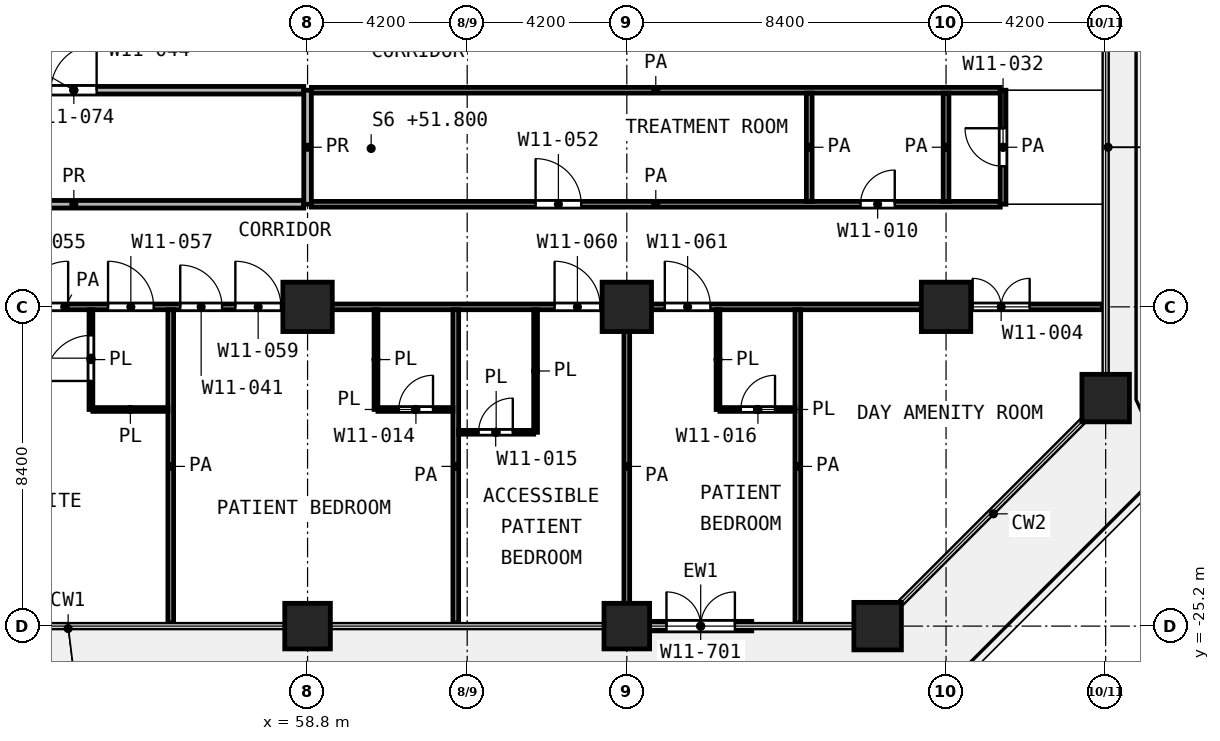
"""IFC4 building model, lengths in metres.
Left out: names, types, materials, properties, quantities, classifications, styles, units other than length and angle.
Written with IfcOpenShell. Run it as: python <this file> out.ifc"""

import sys

from ifc_helpers import new_model, si_unit, direction, frame, frame_2d, origin, origin_2d, place, context, subcontext, project, spatial, rectangle, extrude, element, fill, save


model = new_model("IFC4")
c1 = context("Model", 3, precision=1e-05, world=origin(), true_north=direction((0.0, 1.0)))
c2 = subcontext(c1, "Body", "Model", "MODEL_VIEW")
j1 = project(units=[si_unit("LENGTHUNIT", "METRE"), si_unit("PLANEANGLEUNIT", "RADIAN")], contexts=[c1])
p1 = place(None, origin())
s1 = spatial("IfcSite", under=j1, at=p1, CompositionType="ELEMENT")
p2 = place(p1, origin())
s2 = spatial("IfcBuilding", under=s1, at=p2, CompositionType="ELEMENT")
p3 = place(p2, frame((0.0, 0.0, 51.8)))
s3 = spatial("IfcBuildingStorey", under=s2, at=p3, CompositionType="ELEMENT", Elevation=51.8)
for number, where, z_axis, x_axis in (
    (1, (58.8, -16.8, 0.0), (0.0, 0.0, 1.0), (1.0, 0.0, 0.0)),
    (2, (67.2, -16.8, 0.0), (0.0, 0.0, 1.0), (1.0, 0.0, 0.0)),
    (3, (75.6, -16.8, 0.0), (0.0, 0.0, 1.0), (1.0, 0.0, 0.0)),
):
    element("IfcColumn", number, at=place(p3, frame(where, z_axis=z_axis, x_axis=x_axis)), inside=s3, PredefinedType="COLUMN", context=c2, shape_type="SweptSolid", body=[
        extrude(rectangle(XDim=1.3, YDim=1.3, at=origin_2d()), origin(), (0.0, 0.0, 1.0), 4.2),
    ])
p4 = place(p3, frame((79.8, -19.2, 0.0), z_axis=(0.0, 0.0, 1.0), x_axis=(1.0, 0.0, 0.0)))
e4 = element("IfcColumn", 4, at=p4, inside=s3, PredefinedType="COLUMN", context=c2, shape_type="SweptSolid", body=[
    extrude(rectangle(XDim=1.25, YDim=1.25, at=origin_2d()), origin(), (0.0, 0.0, 1.0), 4.2),
])
for number, where, z_axis, x_axis in (
    (5, (58.8, -25.2, 0.0), (0.0, 0.0, 1.0), (1.0, 0.0, 0.0)),
    (6, (67.2, -25.2, 0.0), (0.0, 0.0, 1.0), (1.0, 0.0, 0.0)),
):
    element("IfcColumn", number, at=place(p3, frame(where, z_axis=z_axis, x_axis=x_axis)), inside=s3, PredefinedType="COLUMN", context=c2, shape_type="SweptSolid", body=[
        extrude(rectangle(XDim=1.2, YDim=1.2, at=origin_2d()), origin(), (0.0, 0.0, 1.0), 4.2),
    ])
p5 = place(p3, frame((73.8, -25.2, 0.0), z_axis=(0.0, 0.0, 1.0), x_axis=(1.0, 0.0, 0.0)))
e7 = element("IfcColumn", 7, at=p5, inside=s3, PredefinedType="COLUMN", context=c2, shape_type="SweptSolid", body=[
    extrude(rectangle(XDim=1.25, YDim=1.25, at=origin_2d()), origin(), (0.0, 0.0, 1.0), 4.2),
])
p6 = place(p3, frame((67.8, -25.2, 0.0), z_axis=(0.0, 0.0, 1.0), x_axis=(1.0, 0.0, 0.0)))
e8 = element("IfcWall", 8, at=p6, inside=s3, PredefinedType="SOLIDWALL", context=c2, shape_type="SweptSolid", body=[
    extrude(rectangle(XDim=2.688, YDim=0.25, at=frame_2d((1.344, 0.0))), origin(), (0.0, 0.0, 1.0), 3.78),
])
p7 = place(p6, frame((0.444, 0.0, 0.0)))
e9 = element("IfcOpeningElement", 9, at=p7, cuts=e8, PredefinedType="OPENING", context=c2, shape_type="SweptSolid", body=[
    extrude(rectangle(XDim=1.8, YDim=2.1, at=frame_2d((0.9, 1.05))), frame((0.0, 0.135, 0.0), z_axis=(0.0, -1.0, 0.0), x_axis=(1.0, 0.0, 0.0)), (0.0, 0.0, 1.0), 0.27),
])
p8 = place(p3, frame((62.775, -20.1, 0.0), z_axis=(0.0, 0.0, 1.0), x_axis=(1.0, 0.0, 0.0)))
e10 = element("IfcWall", 10, at=p8, inside=s3, PredefinedType="PARTITIONING", context=c2, shape_type="SweptSolid", body=[
    extrude(rectangle(XDim=1.975, YDim=0.1, at=frame_2d((0.988, 0.0))), origin(), (0.0, 0.0, 1.0), 3.9),
])
p9 = place(p8, frame((0.525, 0.0, 0.0)))
e11 = element("IfcOpeningElement", 11, at=p9, cuts=e10, PredefinedType="OPENING", context=c2, shape_type="SweptSolid", body=[
    extrude(rectangle(XDim=0.9, YDim=2.1, at=frame_2d((0.45, 1.05))), frame((0.0, 0.06, 0.0), z_axis=(0.0, -1.0, 0.0), x_axis=(1.0, 0.0, 0.0)), (0.0, 0.0, 1.0), 0.12),
])
p10 = place(p3, frame((53.15, -19.5, 0.0), z_axis=(0.0, 0.0, 1.0), x_axis=(1.0, 0.0, 0.0)))
e12 = element("IfcWall", 12, at=p10, inside=s3, PredefinedType="PARTITIONING", context=c2, shape_type="SweptSolid", body=[
    extrude(rectangle(XDim=1.975, YDim=0.1, at=frame_2d((0.988, 0.0))), origin(), (0.0, 0.0, 1.0), 3.9),
])
p11 = place(p3, frame((60.652, -19.5, 0.0), z_axis=(0.0, 0.0, 1.0), x_axis=(1.0, 0.0, 0.0)))
e13 = element("IfcWall", 13, at=p11, inside=s3, PredefinedType="PARTITIONING", context=c2, shape_type="SweptSolid", body=[
    extrude(rectangle(XDim=1.973, YDim=0.1, at=frame_2d((0.986, 0.0))), origin(), (0.0, 0.0, 1.0), 3.9),
])
p12 = place(p11, frame((0.549, 0.0, 0.0)))
e14 = element("IfcOpeningElement", 14, at=p12, cuts=e13, PredefinedType="OPENING", context=c2, shape_type="SweptSolid", body=[
    extrude(rectangle(XDim=0.9, YDim=2.1, at=frame_2d((0.45, 1.05))), frame((0.0, 0.06, 0.0), z_axis=(0.0, -1.0, 0.0), x_axis=(1.0, 0.0, 0.0)), (0.0, 0.0, 1.0), 0.12),
])
p13 = place(p3, frame((69.65, -19.5, 0.0), z_axis=(0.0, 0.0, 1.0), x_axis=(1.0, 0.0, 0.0)))
e15 = element("IfcWall", 15, at=p13, inside=s3, PredefinedType="PARTITIONING", context=c2, shape_type="SweptSolid", body=[
    extrude(rectangle(XDim=1.975, YDim=0.1, at=frame_2d((0.988, 0.0))), origin(), (0.0, 0.0, 1.0), 3.9),
])
p14 = place(p13, frame((0.55, 0.0, 0.0)))
e16 = element("IfcOpeningElement", 16, at=p14, cuts=e15, PredefinedType="OPENING", context=c2, shape_type="SweptSolid", body=[
    extrude(rectangle(XDim=0.9, YDim=2.1, at=frame_2d((0.45, 1.05))), frame((0.0, 0.06, 0.0), z_axis=(0.0, -1.0, 0.0), x_axis=(1.0, 0.0, 0.0)), (0.0, 0.0, 1.0), 0.12),
])
p15 = place(p3, frame((53.1, -19.5, 0.0), z_axis=(0.0, 0.0, 1.0), x_axis=(0.0, 1.0, 0.0)))
e17 = element("IfcWall", 17, at=p15, inside=s3, PredefinedType="PARTITIONING", context=c2, shape_type="SweptSolid", body=[
    extrude(rectangle(XDim=2.625, YDim=0.1, at=frame_2d((1.312, 0.0))), origin(), (0.0, 0.0, 1.0), 3.9),
])
p16 = place(p15, frame((0.75, 0.0, 0.0)))
e18 = element("IfcOpeningElement", 18, at=p16, cuts=e17, PredefinedType="OPENING", context=c2, shape_type="SweptSolid", body=[
    extrude(rectangle(XDim=1.2, YDim=2.1, at=frame_2d((0.6, 1.05))), frame((0.0, 0.06, 0.0), z_axis=(0.0, -1.0, 0.0), x_axis=(1.0, 0.0, 0.0)), (0.0, 0.0, 1.0), 0.12),
])
p17 = place(p3, frame((60.6, -19.499, 0.0), z_axis=(0.0, 0.0, 1.0), x_axis=(0.0, 1.0, 0.0)))
e19 = element("IfcWall", 19, at=p17, inside=s3, PredefinedType="PARTITIONING", context=c2, shape_type="SweptSolid", body=[
    extrude(rectangle(XDim=2.624, YDim=0.1, at=frame_2d((1.312, 0.0))), origin(), (0.0, 0.0, 1.0), 3.9),
])
p18 = place(p3, frame((64.8, -20.1, 0.0), z_axis=(0.0, 0.0, 1.0), x_axis=(0.0, 1.0, 0.0)))
e20 = element("IfcWall", 20, at=p18, inside=s3, PredefinedType="PARTITIONING", context=c2, shape_type="SweptSolid", body=[
    extrude(rectangle(XDim=3.225, YDim=0.1, at=frame_2d((1.613, 0.0))), origin(), (0.0, 0.0, 1.0), 3.9),
])
p19 = place(p3, frame((69.6, -19.5, 0.0), z_axis=(0.0, 0.0, 1.0), x_axis=(0.0, 1.0, 0.0)))
e21 = element("IfcWall", 21, at=p19, inside=s3, PredefinedType="PARTITIONING", context=c2, shape_type="SweptSolid", body=[
    extrude(rectangle(XDim=2.625, YDim=0.1, at=frame_2d((1.312, 0.0))), origin(), (0.0, 0.0, 1.0), 3.9),
])
p20 = place(p3, frame((25.1, -16.8, 0.0), z_axis=(0.0, 0.0, 1.0), x_axis=(1.0, 0.0, 0.0)))
e22 = element("IfcWall", 22, at=p20, inside=s3, PredefinedType="PARTITIONING", context=c2, shape_type="SweptSolid", body=[
    extrude(rectangle(XDim=54.62, YDim=0.15, at=frame_2d((27.31, 0.0))), origin(), (0.0, 0.0, 1.0), 3.9),
])
p21 = place(p20, frame((1.45, 0.0, 0.0)))
e23 = element("IfcOpeningElement", 23, at=p21, cuts=e22, PredefinedType="OPENING", context=c2, shape_type="SweptSolid", body=[
    extrude(rectangle(XDim=1.5, YDim=2.1, at=frame_2d((0.75, 1.05))), frame((0.0, 0.085, 0.0), z_axis=(0.0, -1.0, 0.0), x_axis=(1.0, 0.0, 0.0)), (0.0, 0.0, 1.0), 0.17),
])
p22 = place(p20, frame((9.25, 0.0, 0.0)))
e24 = element("IfcOpeningElement", 24, at=p22, cuts=e22, PredefinedType="OPENING", context=c2, shape_type="SweptSolid", body=[
    extrude(rectangle(XDim=1.5, YDim=2.1, at=frame_2d((0.75, 1.05))), frame((0.0, 0.085, 0.0), z_axis=(0.0, -1.0, 0.0), x_axis=(1.0, 0.0, 0.0)), (0.0, 0.0, 1.0), 0.17),
])
p23 = place(p20, frame((15.0, 0.0, 0.0)))
e25 = element("IfcOpeningElement", 25, at=p23, cuts=e22, PredefinedType="OPENING", context=c2, shape_type="SweptSolid", body=[
    extrude(rectangle(XDim=1.2, YDim=2.1, at=frame_2d((0.6, 1.05))), frame((0.0, 0.085, 0.0), z_axis=(0.0, -1.0, 0.0), x_axis=(1.0, 0.0, 0.0)), (0.0, 0.0, 1.0), 0.17),
])
p24 = place(p20, frame((17.6, 0.0, 0.0)))
e26 = element("IfcOpeningElement", 26, at=p24, cuts=e22, PredefinedType="OPENING", context=c2, shape_type="SweptSolid", body=[
    extrude(rectangle(XDim=1.2, YDim=2.1, at=frame_2d((0.6, 1.05))), frame((0.0, 0.085, 0.0), z_axis=(0.0, -1.0, 0.0), x_axis=(1.0, 0.0, 0.0)), (0.0, 0.0, 1.0), 0.17),
])
p25 = place(p20, frame((26.2, 0.0, 0.0)))
e27 = element("IfcOpeningElement", 27, at=p25, cuts=e22, PredefinedType="OPENING", context=c2, shape_type="SweptSolid", body=[
    extrude(rectangle(XDim=1.2, YDim=2.1, at=frame_2d((0.6, 1.05))), frame((0.0, 0.085, 0.0), z_axis=(0.0, -1.0, 0.0), x_axis=(1.0, 0.0, 0.0)), (0.0, 0.0, 1.0), 0.17),
])
p26 = place(p20, frame((23.4, 0.0, 0.0)))
e28 = element("IfcOpeningElement", 28, at=p26, cuts=e22, PredefinedType="OPENING", context=c2, shape_type="SweptSolid", body=[
    extrude(rectangle(XDim=1.2, YDim=2.1, at=frame_2d((0.6, 1.05))), frame((0.0, 0.085, 0.0), z_axis=(0.0, -1.0, 0.0), x_axis=(1.0, 0.0, 0.0)), (0.0, 0.0, 1.0), 0.17),
])
p27 = place(p20, frame((28.45, 0.0, 0.0)))
e29 = element("IfcOpeningElement", 29, at=p27, cuts=e22, PredefinedType="OPENING", context=c2, shape_type="SweptSolid", body=[
    extrude(rectangle(XDim=1.2, YDim=2.1, at=frame_2d((0.6, 1.05))), frame((0.0, 0.085, 0.0), z_axis=(0.0, -1.0, 0.0), x_axis=(1.0, 0.0, 0.0)), (0.0, 0.0, 1.0), 0.17),
])
p28 = place(p20, frame((31.8, 0.0, 0.0)))
e30 = element("IfcOpeningElement", 30, at=p28, cuts=e22, PredefinedType="OPENING", context=c2, shape_type="SweptSolid", body=[
    extrude(rectangle(XDim=1.2, YDim=2.1, at=frame_2d((0.6, 1.05))), frame((0.0, 0.085, 0.0), z_axis=(0.0, -1.0, 0.0), x_axis=(1.0, 0.0, 0.0)), (0.0, 0.0, 1.0), 0.17),
])
p29 = place(p20, frame((30.35, 0.0, 0.0)))
e31 = element("IfcOpeningElement", 31, at=p29, cuts=e22, PredefinedType="OPENING", context=c2, shape_type="SweptSolid", body=[
    extrude(rectangle(XDim=1.1, YDim=2.1, at=frame_2d((0.55, 1.05))), frame((0.0, 0.085, 0.0), z_axis=(0.0, -1.0, 0.0), x_axis=(1.0, 0.0, 0.0)), (0.0, 0.0, 1.0), 0.17),
])
p30 = place(p20, frame((40.2, 0.0, 0.0)))
e32 = element("IfcOpeningElement", 32, at=p30, cuts=e22, PredefinedType="OPENING", context=c2, shape_type="SweptSolid", body=[
    extrude(rectangle(XDim=1.2, YDim=2.1, at=frame_2d((0.6, 1.05))), frame((0.0, 0.085, 0.0), z_axis=(0.0, -1.0, 0.0), x_axis=(1.0, 0.0, 0.0)), (0.0, 0.0, 1.0), 0.17),
])
p31 = place(p20, frame((43.1, 0.0, 0.0)))
e33 = element("IfcOpeningElement", 33, at=p31, cuts=e22, PredefinedType="OPENING", context=c2, shape_type="SweptSolid", body=[
    extrude(rectangle(XDim=1.2, YDim=2.1, at=frame_2d((0.6, 1.05))), frame((0.0, 0.085, 0.0), z_axis=(0.0, -1.0, 0.0), x_axis=(1.0, 0.0, 0.0)), (0.0, 0.0, 1.0), 0.17),
])
p32 = place(p20, frame((51.2, 0.0, 0.0)))
e34 = element("IfcOpeningElement", 34, at=p32, cuts=e22, PredefinedType="OPENING", context=c2, shape_type="SweptSolid", body=[
    extrude(rectangle(XDim=1.5, YDim=2.1, at=frame_2d((0.75, 1.05))), frame((0.0, 0.085, 0.0), z_axis=(0.0, -1.0, 0.0), x_axis=(1.0, 0.0, 0.0)), (0.0, 0.0, 1.0), 0.17),
])
p33 = place(p3, frame((58.9, -14.1, 0.0), z_axis=(0.0, 0.0, 1.0), x_axis=(1.0, 0.0, 0.0)))
e35 = element("IfcWall", 35, at=p33, inside=s3, PredefinedType="PARTITIONING", context=c2, shape_type="SweptSolid", body=[
    extrude(rectangle(XDim=18.125, YDim=0.15, at=frame_2d((9.062, 0.0))), origin(), (0.0, 0.0, 1.0), 3.9),
])
p34 = place(p33, frame((5.9, 0.0, 0.0)))
e36 = element("IfcOpeningElement", 36, at=p34, cuts=e35, PredefinedType="OPENING", context=c2, shape_type="SweptSolid", body=[
    extrude(rectangle(XDim=1.2, YDim=2.1, at=frame_2d((0.6, 1.05))), frame((0.0, 0.085, 0.0), z_axis=(0.0, -1.0, 0.0), x_axis=(1.0, 0.0, 0.0)), (0.0, 0.0, 1.0), 0.17),
])
p35 = place(p33, frame((14.45, 0.0, 0.0)))
e37 = element("IfcOpeningElement", 37, at=p35, cuts=e35, PredefinedType="OPENING", context=c2, shape_type="SweptSolid", body=[
    extrude(rectangle(XDim=0.9, YDim=2.1, at=frame_2d((0.45, 1.05))), frame((0.0, 0.085, 0.0), z_axis=(0.0, -1.0, 0.0), x_axis=(1.0, 0.0, 0.0)), (0.0, 0.0, 1.0), 0.17),
])
p36 = place(p3, frame((58.9, -11.1, 0.0), z_axis=(0.0, 0.0, 1.0), x_axis=(1.0, 0.0, 0.0)))
e38 = element("IfcWall", 38, at=p36, inside=s3, PredefinedType="PARTITIONING", context=c2, shape_type="SweptSolid", body=[
    extrude(rectangle(XDim=18.125, YDim=0.15, at=frame_2d((9.062, 0.0))), origin(), (0.0, 0.0, 1.0), 3.9),
])
for number, where, z_axis, x_axis in (
    (39, (55.2, -25.12, 0.0), (0.0, 0.0, 1.0), (0.0, 1.0, 0.0)),
    (40, (62.7, -25.12, 0.0), (0.0, 0.0, 1.0), (0.0, 1.0, 0.0)),
    (41, (67.2, -25.12, 0.0), (0.0, 0.0, 1.0), (0.0, 1.0, 0.0)),
    (42, (71.7, -25.12, 0.0), (0.0, 0.0, 1.0), (0.0, 1.0, 0.0)),
):
    element("IfcWall", number, at=place(p3, frame(where, z_axis=z_axis, x_axis=x_axis)), inside=s3, PredefinedType="PARTITIONING", context=c2, shape_type="SweptSolid", body=[
        extrude(rectangle(XDim=8.245, YDim=0.15, at=frame_2d((4.123, 0.0))), origin(), (0.0, 0.0, 1.0), 3.9),
    ])
for number, where, z_axis, x_axis in (
    (43, (72.0, -14.025, 0.0), (0.0, 0.0, 1.0), (0.0, 1.0, 0.0)),
    (44, (75.6, -14.025, 0.0), (0.0, 0.0, 1.0), (0.0, 1.0, 0.0)),
):
    element("IfcWall", number, at=place(p3, frame(where, z_axis=z_axis, x_axis=x_axis)), inside=s3, PredefinedType="PARTITIONING", context=c2, shape_type="SweptSolid", body=[
        extrude(rectangle(XDim=2.85, YDim=0.15, at=frame_2d((1.425, 0.0))), origin(), (0.0, 0.0, 1.0), 3.9),
    ])
p37 = place(p3, frame((77.1, -14.1, 0.0), z_axis=(0.0, 0.0, 1.0), x_axis=(0.0, 1.0, 0.0)))
e45 = element("IfcWall", 45, at=p37, inside=s3, PredefinedType="PARTITIONING", context=c2, shape_type="SweptSolid", body=[
    extrude(rectangle(XDim=3.0, YDim=0.15, at=frame_2d((1.5, 0.0))), origin(), (0.0, 0.0, 1.0), 3.9),
])
p38 = place(p37, frame((1.0, 0.0, 0.0)))
e46 = element("IfcOpeningElement", 46, at=p38, cuts=e45, PredefinedType="OPENING", context=c2, shape_type="SweptSolid", body=[
    extrude(rectangle(XDim=1.0, YDim=2.1, at=frame_2d((0.5, 1.05))), frame((0.0, 0.085, 0.0), z_axis=(0.0, -1.0, 0.0), x_axis=(1.0, 0.0, 0.0)), (0.0, 0.0, 1.0), 0.17),
])
p39 = place(p3, frame((46.6, -14.1, 0.0), z_axis=(0.0, 0.0, 1.0), x_axis=(1.0, 0.0, 0.0)))
e47 = element("IfcWall", 47, at=p39, inside=s3, PredefinedType="PARTITIONING", context=c2, shape_type="SweptSolid", body=[
    extrude(rectangle(XDim=12.1, YDim=0.2, at=frame_2d((6.05, 0.0))), origin(), (0.0, 0.0, 1.0), 3.9),
])
p40 = place(p3, frame((46.6, -11.1, 0.0), z_axis=(0.0, 0.0, 1.0), x_axis=(1.0, 0.0, 0.0)))
e48 = element("IfcWall", 48, at=p40, inside=s3, PredefinedType="PARTITIONING", context=c2, shape_type="SweptSolid", body=[
    extrude(rectangle(XDim=12.1, YDim=0.2, at=frame_2d((6.05, 0.0))), origin(), (0.0, 0.0, 1.0), 3.9),
])
p41 = place(p40, frame((5.45, 0.0, 0.0)))
e49 = element("IfcOpeningElement", 49, at=p41, cuts=e48, PredefinedType="OPENING", context=c2, shape_type="SweptSolid", body=[
    extrude(rectangle(XDim=1.2, YDim=2.1, at=frame_2d((0.6, 1.05))), frame((0.0, 0.11, 0.0), z_axis=(0.0, -1.0, 0.0), x_axis=(1.0, 0.0, 0.0)), (0.0, 0.0, 1.0), 0.22),
])
p42 = place(p3, frame((58.8, -14.1, 0.0), z_axis=(0.0, 0.0, 1.0), x_axis=(0.0, 1.0, 0.0)))
e50 = element("IfcWall", 50, at=p42, inside=s3, PredefinedType="PARTITIONING", context=c2, shape_type="SweptSolid", body=[
    extrude(rectangle(XDim=3.0, YDim=0.2, at=frame_2d((1.5, 0.0))), origin(), (0.0, 0.0, 1.0), 3.9),
])
p43 = place(p7, origin())
e51 = element("IfcDoor", 51, at=p43, inside=s3, OperationType="DOUBLE_DOOR_SINGLE_SWING", PredefinedType="DOOR", context=c2, shape_type="SweptSolid", body=[
    extrude(rectangle(XDim=1.8, YDim=2.1, at=frame_2d((0.9, 1.05))), frame((0.0, 0.025, 0.0), z_axis=(0.0, -1.0, 0.0), x_axis=(1.0, 0.0, 0.0)), (0.0, 0.0, 1.0), 0.05),
])
fill(e9, e51)
p44 = place(p41, origin())
e52 = element("IfcDoor", 52, at=p44, inside=s3, OperationType="SINGLE_SWING_RIGHT", PredefinedType="DOOR", context=c2, shape_type="SweptSolid", body=[
    extrude(rectangle(XDim=1.2, YDim=2.1, at=frame_2d((0.6, 1.05))), frame((0.0, 0.025, 0.0), z_axis=(0.0, -1.0, 0.0), x_axis=(1.0, 0.0, 0.0)), (0.0, 0.0, 1.0), 0.05),
])
fill(e49, e52)
p45 = place(p34, origin())
e53 = element("IfcDoor", 53, at=p45, inside=s3, OperationType="SINGLE_SWING_LEFT", PredefinedType="DOOR", context=c2, shape_type="SweptSolid", body=[
    extrude(rectangle(XDim=1.2, YDim=2.1, at=frame_2d((0.6, 1.05))), frame((0.0, 0.025, 0.0), z_axis=(0.0, -1.0, 0.0), x_axis=(1.0, 0.0, 0.0)), (0.0, 0.0, 1.0), 0.05),
])
fill(e36, e53)
p46 = place(p35, origin())
e54 = element("IfcDoor", 54, at=p46, inside=s3, OperationType="SINGLE_SWING_RIGHT", PredefinedType="DOOR", context=c2, shape_type="SweptSolid", body=[
    extrude(rectangle(XDim=0.9, YDim=2.1, at=frame_2d((0.45, 1.05))), frame((0.0, 0.025, 0.0), z_axis=(0.0, -1.0, 0.0), x_axis=(1.0, 0.0, 0.0)), (0.0, 0.0, 1.0), 0.05),
])
fill(e37, e54)
p47 = place(p38, origin())
e55 = element("IfcDoor", 55, at=p47, inside=s3, OperationType="SINGLE_SWING_RIGHT", PredefinedType="DOOR", context=c2, shape_type="SweptSolid", body=[
    extrude(rectangle(XDim=1.0, YDim=2.1, at=frame_2d((0.5, 1.05))), frame((0.0, 0.025, 0.0), z_axis=(0.0, -1.0, 0.0), x_axis=(1.0, 0.0, 0.0)), (0.0, 0.0, 1.0), 0.05),
])
fill(e46, e55)
p48 = place(p25, origin())
e56 = element("IfcDoor", 56, at=p48, inside=s3, OperationType="SINGLE_SWING_RIGHT", PredefinedType="DOOR", context=c2, shape_type="SweptSolid", body=[
    extrude(rectangle(XDim=1.2, YDim=2.1, at=frame_2d((0.6, 1.05))), frame((0.0, 0.025, 0.0), z_axis=(0.0, -1.0, 0.0), x_axis=(1.0, 0.0, 0.0)), (0.0, 0.0, 1.0), 0.05),
])
fill(e27, e56)
p49 = place(p27, origin())
e57 = element("IfcDoor", 57, at=p49, inside=s3, OperationType="SINGLE_SWING_LEFT", PredefinedType="DOOR", context=c2, shape_type="SweptSolid", body=[
    extrude(rectangle(XDim=1.2, YDim=2.1, at=frame_2d((0.6, 1.05))), frame((0.0, 0.025, 0.0), z_axis=(0.0, -1.0, 0.0), x_axis=(1.0, 0.0, 0.0)), (0.0, 0.0, 1.0), 0.05),
])
fill(e29, e57)
p50 = place(p16, origin())
e58 = element("IfcDoor", 58, at=p50, inside=s3, OperationType="SINGLE_SWING_LEFT", PredefinedType="DOOR", context=c2, shape_type="SweptSolid", body=[
    extrude(rectangle(XDim=1.2, YDim=2.1, at=frame_2d((0.6, 1.05))), frame((0.0, 0.025, 0.0), z_axis=(0.0, -1.0, 0.0), x_axis=(1.0, 0.0, 0.0)), (0.0, 0.0, 1.0), 0.05),
])
fill(e18, e58)
p51 = place(p28, origin())
e59 = element("IfcDoor", 59, at=p51, inside=s3, OperationType="SINGLE_SWING_LEFT", PredefinedType="DOOR", context=c2, shape_type="SweptSolid", body=[
    extrude(rectangle(XDim=1.2, YDim=2.1, at=frame_2d((0.6, 1.05))), frame((0.0, 0.025, 0.0), z_axis=(0.0, -1.0, 0.0), x_axis=(1.0, 0.0, 0.0)), (0.0, 0.0, 1.0), 0.05),
])
fill(e30, e59)
p52 = place(p29, origin())
e60 = element("IfcDoor", 60, at=p52, inside=s3, OperationType="SINGLE_SWING_LEFT", PredefinedType="DOOR", context=c2, shape_type="SweptSolid", body=[
    extrude(rectangle(XDim=1.1, YDim=2.1, at=frame_2d((0.55, 1.05))), frame((0.0, 0.025, 0.0), z_axis=(0.0, -1.0, 0.0), x_axis=(1.0, 0.0, 0.0)), (0.0, 0.0, 1.0), 0.05),
])
fill(e31, e60)
p53 = place(p12, origin())
e61 = element("IfcDoor", 61, at=p53, inside=s3, OperationType="SINGLE_SWING_RIGHT", PredefinedType="DOOR", context=c2, shape_type="SweptSolid", body=[
    extrude(rectangle(XDim=0.9, YDim=2.1, at=frame_2d((0.45, 1.05))), frame((0.0, 0.025, 0.0), z_axis=(0.0, -1.0, 0.0), x_axis=(1.0, 0.0, 0.0)), (0.0, 0.0, 1.0), 0.05),
])
fill(e14, e61)
p54 = place(p30, origin())
e62 = element("IfcDoor", 62, at=p54, inside=s3, OperationType="SINGLE_SWING_LEFT", PredefinedType="DOOR", context=c2, shape_type="SweptSolid", body=[
    extrude(rectangle(XDim=1.2, YDim=2.1, at=frame_2d((0.6, 1.05))), frame((0.0, 0.025, 0.0), z_axis=(0.0, -1.0, 0.0), x_axis=(1.0, 0.0, 0.0)), (0.0, 0.0, 1.0), 0.05),
])
fill(e32, e62)
p55 = place(p9, origin())
e63 = element("IfcDoor", 63, at=p55, inside=s3, OperationType="SINGLE_SWING_RIGHT", PredefinedType="DOOR", context=c2, shape_type="SweptSolid", body=[
    extrude(rectangle(XDim=0.9, YDim=2.1, at=frame_2d((0.45, 1.05))), frame((0.0, 0.025, 0.0), z_axis=(0.0, -1.0, 0.0), x_axis=(1.0, 0.0, 0.0)), (0.0, 0.0, 1.0), 0.05),
])
fill(e11, e63)
p56 = place(p31, origin())
e64 = element("IfcDoor", 64, at=p56, inside=s3, OperationType="SINGLE_SWING_LEFT", PredefinedType="DOOR", context=c2, shape_type="SweptSolid", body=[
    extrude(rectangle(XDim=1.2, YDim=2.1, at=frame_2d((0.6, 1.05))), frame((0.0, 0.025, 0.0), z_axis=(0.0, -1.0, 0.0), x_axis=(1.0, 0.0, 0.0)), (0.0, 0.0, 1.0), 0.05),
])
fill(e33, e64)
p57 = place(p14, origin())
e65 = element("IfcDoor", 65, at=p57, inside=s3, OperationType="SINGLE_SWING_RIGHT", PredefinedType="DOOR", context=c2, shape_type="SweptSolid", body=[
    extrude(rectangle(XDim=0.9, YDim=2.1, at=frame_2d((0.45, 1.05))), frame((0.0, 0.025, 0.0), z_axis=(0.0, -1.0, 0.0), x_axis=(1.0, 0.0, 0.0)), (0.0, 0.0, 1.0), 0.05),
])
fill(e16, e65)
p58 = place(p32, origin())
e66 = element("IfcDoor", 66, at=p58, inside=s3, OperationType="DOUBLE_DOOR_SINGLE_SWING", PredefinedType="DOOR", context=c2, shape_type="SweptSolid", body=[
    extrude(rectangle(XDim=1.5, YDim=2.1, at=frame_2d((0.75, 1.05))), frame((0.0, 0.025, 0.0), z_axis=(0.0, -1.0, 0.0), x_axis=(1.0, 0.0, 0.0)), (0.0, 0.0, 1.0), 0.05),
])
fill(e34, e66)
save(model, sys.argv[1])
